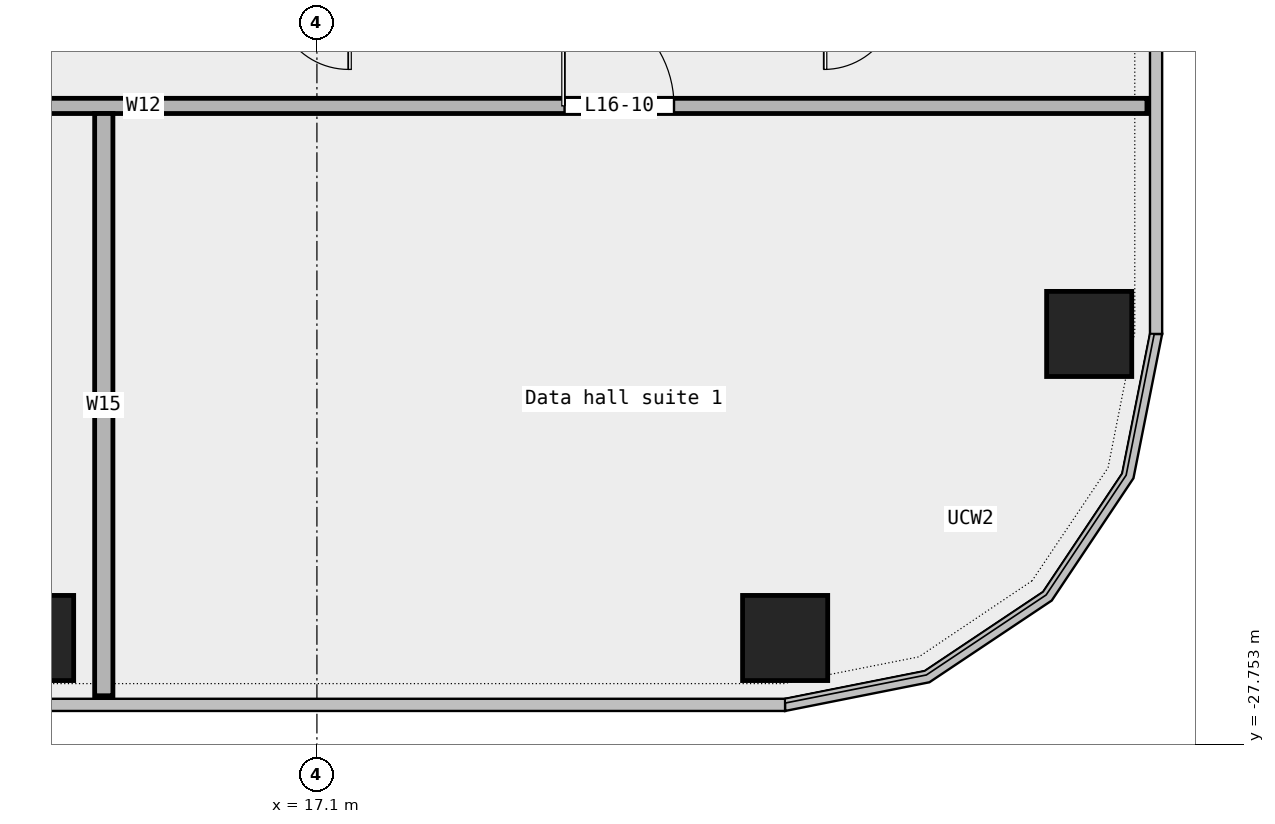
"""IFC4 building model, lengths in metres.
Left out: names, types, materials, properties, quantities, classifications, styles, units other than length and angle.
Written with IfcOpenShell. Run it as: python <this file> out.ifc"""

import sys

from ifc_helpers import new_model, si_unit, direction, frame, frame_2d, origin, origin_2d, place, context, subcontext, project, spatial, rectangle, extrude, element, fill, save


model = new_model("IFC4")
c1 = context("Model", 3, precision=1e-05, world=origin(), true_north=direction((0.0, 1.0)))
c2 = subcontext(c1, "Body", "Model", "MODEL_VIEW")
j1 = project(units=[si_unit("LENGTHUNIT", "METRE"), si_unit("PLANEANGLEUNIT", "RADIAN")], contexts=[c1])
p1 = place(None, origin())
s1 = spatial("IfcSite", under=j1, at=p1, CompositionType="ELEMENT")
p2 = place(p1, origin())
s2 = spatial("IfcBuilding", under=s1, at=p2, CompositionType="ELEMENT")
p3 = place(p2, frame((0.0, 0.0, 83.8)))
s3 = spatial("IfcBuildingStorey", under=s2, at=p3, CompositionType="ELEMENT", Elevation=83.8)
for number, where, z_axis, x_axis in (
    (1, (12.4, -26.0, 0.0), (0.0, 0.0, 1.0), (1.0, 0.0, 0.0)),
    (2, (24.8, -26.0, 0.0), (0.0, 0.0, 1.0), (1.0, 0.0, 0.0)),
    (3, (29.8, -21.0, 0.0), (0.0, 0.0, 1.0), (1.0, 0.0, 0.0)),
):
    element("IfcColumn", number, at=place(p3, frame(where, z_axis=z_axis, x_axis=x_axis)), inside=s3, PredefinedType="COLUMN", context=c2, shape_type="SweptSolid", body=[
        extrude(rectangle(XDim=1.4, YDim=1.4, at=origin_2d()), origin(), (0.0, 0.0, 1.0), 4.2),
    ])
p4 = place(p3, frame((-2.255, -17.25, 0.0), z_axis=(0.0, 0.0, 1.0), x_axis=(1.0, 0.0, 0.0)))
e4 = element("IfcWall", 4, at=p4, inside=s3, PredefinedType="PARTITIONING", context=c2, shape_type="SweptSolid", body=[
    extrude(rectangle(XDim=33.005, YDim=0.25, at=frame_2d((16.502, 0.0))), origin(), (0.0, 0.0, 1.0), 4.2),
])
p5 = place(p4, frame((7.025, 0.0, 0.0)))
e5 = element("IfcOpeningElement", 5, at=p5, cuts=e4, PredefinedType="OPENING", context=c2, shape_type="SweptSolid", body=[
    extrude(rectangle(XDim=1.8, YDim=2.1, at=frame_2d((0.9, 1.05))), frame((0.0, 0.137, 0.0), z_axis=(0.0, -1.0, 0.0), x_axis=(1.0, 0.0, 0.0)), (0.0, 0.0, 1.0), 0.274),
])
p6 = place(p4, frame((23.427, 0.0, 0.0)))
e6 = element("IfcOpeningElement", 6, at=p6, cuts=e4, PredefinedType="OPENING", context=c2, shape_type="SweptSolid", body=[
    extrude(rectangle(XDim=1.8, YDim=2.1, at=frame_2d((0.9, 1.05))), frame((0.0, 0.137, 0.0), z_axis=(0.0, -1.0, 0.0), x_axis=(1.0, 0.0, 0.0)), (0.0, 0.0, 1.0), 0.274),
])
p7 = place(p3, frame((13.595, -26.95, 0.0), z_axis=(0.0, 0.0, 1.0), x_axis=(0.0, 1.0, 0.0)))
e7 = element("IfcWall", 7, at=p7, inside=s3, PredefinedType="PARTITIONING", context=c2, shape_type="SweptSolid", body=[
    extrude(rectangle(XDim=9.575, YDim=0.3, at=frame_2d((4.788, 0.0))), origin(), (0.0, 0.0, 1.0), 4.2),
])
p8 = place(p6, origin())
e8 = element("IfcDoor", 8, at=p8, inside=s3, OperationType="DOUBLE_DOOR_SINGLE_SWING", PredefinedType="DOOR", context=c2, shape_type="SweptSolid", body=[
    extrude(rectangle(XDim=1.8, YDim=2.1, at=frame_2d((0.9, 1.05))), frame((0.0, 0.025, 0.0), z_axis=(0.0, -1.0, 0.0), x_axis=(1.0, 0.0, 0.0)), (0.0, 0.0, 1.0), 0.05),
])
fill(e6, e8)
save(model, sys.argv[1])
